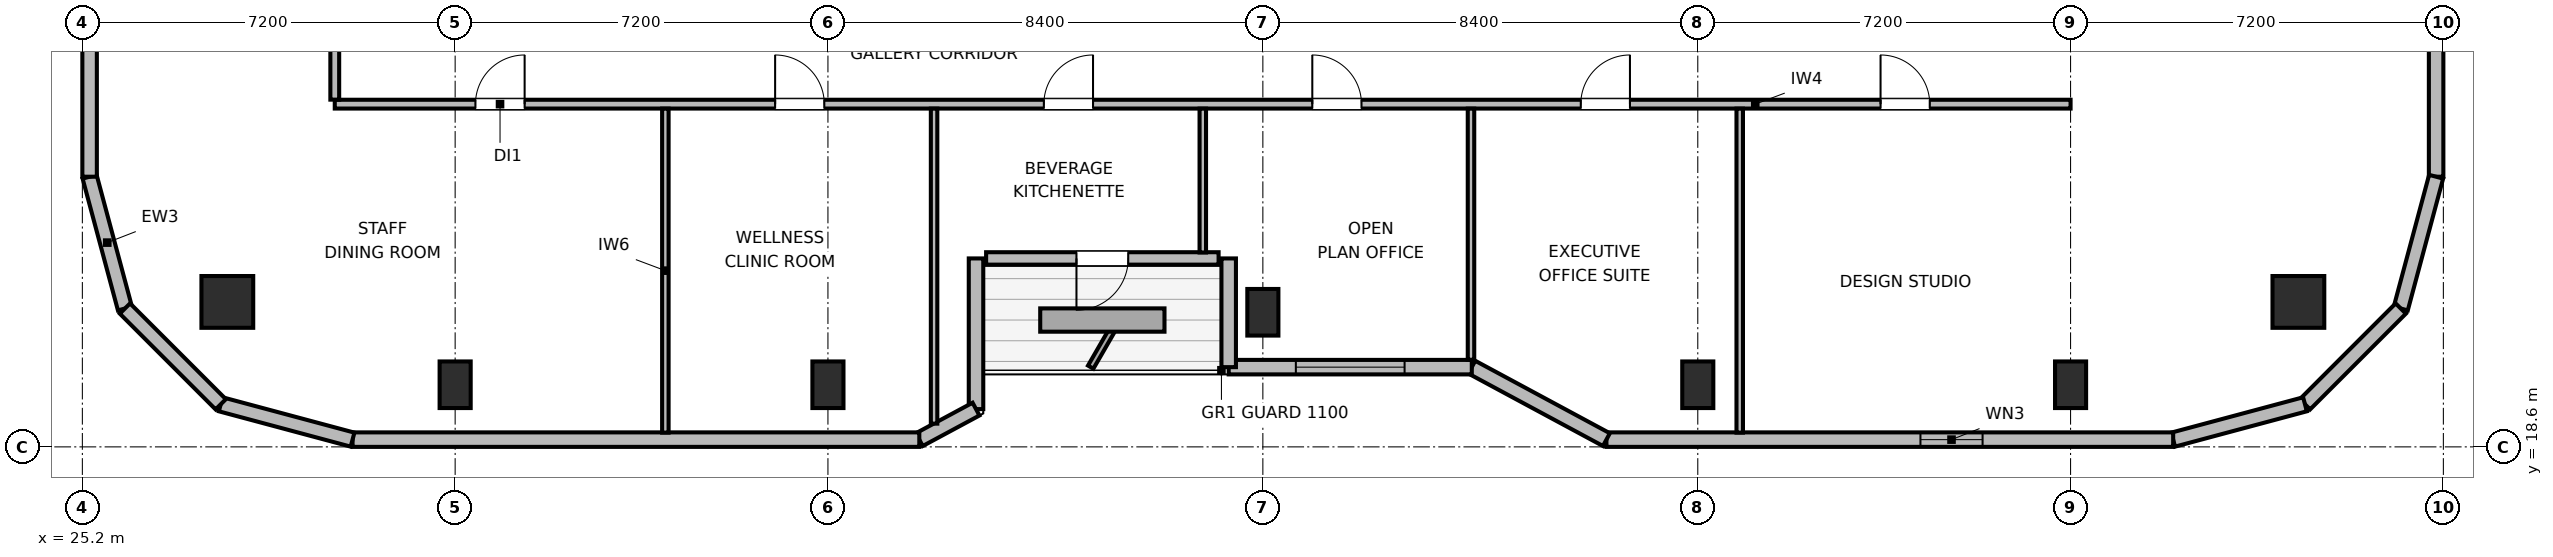
"""IFC4 building model, lengths in metres.
Left out: names, types, materials, properties, quantities, classifications, styles, units other than length and angle.
Written with IfcOpenShell. Run it as: python <this file> out.ifc"""

import sys

from ifc_helpers import new_model, si_unit, direction, frame, frame_2d, origin, origin_2d, place, context, subcontext, project, spatial, rectangle, circle, extrude, element, fill, save


model = new_model("IFC4")
c1 = context("Model", 3, precision=1e-05, world=origin(), true_north=direction((0.0, 1.0)))
c2 = subcontext(c1, "Body", "Model", "MODEL_VIEW")
j1 = project(units=[si_unit("LENGTHUNIT", "METRE"), si_unit("PLANEANGLEUNIT", "RADIAN")], contexts=[c1])
p1 = place(None, origin())
s1 = spatial("IfcSite", under=j1, at=p1, CompositionType="ELEMENT")
p2 = place(p1, origin())
s2 = spatial("IfcBuilding", under=s1, at=p2, CompositionType="ELEMENT")
p3 = place(p2, frame((0.0, 0.0, 247.2)))
s3 = spatial("IfcBuildingStorey", under=s2, at=p3, CompositionType="ELEMENT", Elevation=247.2)
for number, where, z_axis, x_axis in (
    (1, (28.0, 21.4, 0.0), (0.0, 0.0, 1.0), (1.0, 0.0, 0.0)),
    (2, (68.0, 21.4, 0.0), (0.0, 0.0, 1.0), (1.0, 0.0, 0.0)),
):
    element("IfcColumn", number, at=place(p3, frame(where, z_axis=z_axis, x_axis=x_axis)), inside=s3, PredefinedType="COLUMN", context=c2, shape_type="SweptSolid", body=[
        extrude(circle(Radius=0.5, at=origin_2d()), origin(), (0.0, 0.0, 1.0), 3.9),
    ])
for number, where, z_axis, x_axis in (
    (3, (32.4, 19.8, 0.0), (0.0, 0.0, 1.0), (1.0, 0.0, 0.0)),
    (4, (39.6, 19.8, 0.0), (0.0, 0.0, 1.0), (1.0, 0.0, 0.0)),
    (5, (48.0, 21.2, 0.0), (0.0, 0.0, 1.0), (1.0, 0.0, 0.0)),
    (6, (56.4, 19.8, 0.0), (0.0, 0.0, 1.0), (1.0, 0.0, 0.0)),
    (7, (63.6, 19.8, 0.0), (0.0, 0.0, 1.0), (1.0, 0.0, 0.0)),
):
    element("IfcColumn", number, at=place(p3, frame(where, z_axis=z_axis, x_axis=x_axis)), inside=s3, PredefinedType="COLUMN", context=c2, shape_type="SweptSolid", body=[
        extrude(rectangle(XDim=0.6, YDim=0.9, at=origin_2d()), origin(), (0.0, 0.0, 1.0), 3.9),
    ])
p4 = place(p3, frame((26.022, 21.272, 0.0), z_axis=(0.0, 0.0, 1.0), x_axis=(-0.2588904131, 0.965906700466, 0.0)))
e8 = element("IfcWall", 8, at=p4, inside=s3, PredefinedType="SOLIDWALL", context=c2, shape_type="SweptSolid", body=[
    extrude(rectangle(XDim=2.636, YDim=0.28, at=frame_2d((1.318, 0.0))), origin(), (0.0, 0.0, 1.0), 3.68),
])
p5 = place(p3, frame((25.34, 23.818, 0.0), z_axis=(0.0, 0.0, 1.0), x_axis=(0.0, 1.0, 0.0)))
e9 = element("IfcWall", 9, at=p5, inside=s3, PredefinedType="SOLIDWALL", context=c2, shape_type="SweptSolid", body=[
    extrude(rectangle(XDim=5.442, YDim=0.28, at=frame_2d((2.721, 0.0))), origin(), (0.0, 0.0, 1.0), 3.68),
])
p6 = place(p3, frame((70.66, 37.66, 0.0), z_axis=(0.0, 0.0, 1.0), x_axis=(0.0, -1.0, 0.0)))
e10 = element("IfcWall", 10, at=p6, inside=s3, PredefinedType="SOLIDWALL", context=c2, shape_type="SweptSolid", body=[
    extrude(rectangle(XDim=13.842, YDim=0.28, at=frame_2d((6.921, 0.0))), origin(), (0.0, 0.0, 1.0), 3.68),
])
p7 = place(p6, frame((5.871, 0.0, 0.85)))
e11 = element("IfcOpeningElement", 11, at=p7, cuts=e10, PredefinedType="OPENING", context=c2, shape_type="SweptSolid", body=[
    extrude(rectangle(XDim=2.1, YDim=1.05, at=frame_2d((1.05, 0.525))), frame((0.0, 0.15, 0.0), z_axis=(0.0, -1.0, 0.0), x_axis=(1.0, 0.0, 0.0)), (0.0, 0.0, 1.0), 0.3),
])
p8 = place(p3, frame((70.66, 23.818, 0.0), z_axis=(0.0, 0.0, 1.0), x_axis=(-0.2588904131, -0.965906700466, 0.0)))
e12 = element("IfcWall", 12, at=p8, inside=s3, PredefinedType="SOLIDWALL", context=c2, shape_type="SweptSolid", body=[
    extrude(rectangle(XDim=2.636, YDim=0.28, at=frame_2d((1.318, 0.0))), origin(), (0.0, 0.0, 1.0), 3.68),
])
p9 = place(p3, frame((69.978, 21.272, 0.0), z_axis=(0.0, 0.0, 1.0), x_axis=(-0.707153437963, -0.707060121331, 0.0)))
e13 = element("IfcWall", 13, at=p9, inside=s3, PredefinedType="SOLIDWALL", context=c2, shape_type="SweptSolid", body=[
    extrude(rectangle(XDim=2.616, YDim=0.28, at=frame_2d((1.308, 0.0))), origin(), (0.0, 0.0, 1.0), 3.68),
])
p10 = place(p3, frame((68.127, 19.423, 0.0), z_axis=(0.0, 0.0, 1.0), x_axis=(-0.965883534663, -0.258976828051, 0.0)))
e14 = element("IfcWall", 14, at=p10, inside=s3, PredefinedType="SOLIDWALL", context=c2, shape_type="SweptSolid", body=[
    extrude(rectangle(XDim=2.636, YDim=0.28, at=frame_2d((1.318, 0.0))), origin(), (0.0, 0.0, 1.0), 3.68),
])
p11 = place(p3, frame((65.582, 18.74, 0.0), z_axis=(0.0, 0.0, 1.0), x_axis=(-1.0, 0.0, 0.0)))
e15 = element("IfcWall", 15, at=p11, inside=s3, PredefinedType="SOLIDWALL", context=c2, shape_type="SweptSolid", body=[
    extrude(rectangle(XDim=10.946, YDim=0.28, at=frame_2d((5.473, 0.0))), origin(), (0.0, 0.0, 1.0), 3.68),
])
p12 = place(p11, frame((3.681, 0.0, 0.85)))
e16 = element("IfcOpeningElement", 16, at=p12, cuts=e15, PredefinedType="OPENING", context=c2, shape_type="SweptSolid", body=[
    extrude(rectangle(XDim=1.2, YDim=1.1, at=frame_2d((0.6, 0.55))), frame((0.0, 0.15, 0.0), z_axis=(0.0, -1.0, 0.0), x_axis=(1.0, 0.0, 0.0)), (0.0, 0.0, 1.0), 0.3),
])
p13 = place(p3, frame((54.635, 18.74, 0.0), z_axis=(0.0, 0.0, 1.0), x_axis=(-0.880473754814, 0.474094892488, 0.0)))
e17 = element("IfcWall", 17, at=p13, inside=s3, PredefinedType="SOLIDWALL", context=c2, shape_type="SweptSolid", body=[
    extrude(rectangle(XDim=2.953, YDim=0.28, at=frame_2d((1.477, 0.0))), origin(), (0.0, 0.0, 1.0), 2.265),
])
p14 = place(p3, frame((52.035, 20.14, 0.0), z_axis=(0.0, 0.0, 1.0), x_axis=(-1.0, 0.0, 0.0)))
e18 = element("IfcWall", 18, at=p14, inside=s3, PredefinedType="SOLIDWALL", context=c2, shape_type="SweptSolid", body=[
    extrude(rectangle(XDim=4.695, YDim=0.28, at=frame_2d((2.348, 0.0))), origin(), (0.0, 0.0, 1.0), 2.265),
])
p15 = place(p14, frame((1.298, 0.0, 0.85)))
e19 = element("IfcOpeningElement", 19, at=p15, cuts=e18, PredefinedType="OPENING", context=c2, shape_type="SweptSolid", body=[
    extrude(rectangle(XDim=2.1, YDim=1.05, at=frame_2d((1.05, 0.525))), frame((0.0, 0.15, 0.0), z_axis=(0.0, -1.0, 0.0), x_axis=(1.0, 0.0, 0.0)), (0.0, 0.0, 1.0), 0.3),
])
p16 = place(p3, frame((47.34, 20.14, 0.0), z_axis=(0.0, 0.0, 1.0), x_axis=(0.0, 1.0, 0.0)))
e20 = element("IfcWall", 20, at=p16, inside=s3, PredefinedType="SOLIDWALL", context=c2, shape_type="SweptSolid", body=[
    extrude(rectangle(XDim=2.1, YDim=0.28, at=frame_2d((1.05, 0.0))), origin(), (0.0, 0.0, 1.0), 2.265),
])
p17 = place(p3, frame((47.145, 22.24, 0.0), z_axis=(0.0, 0.0, 1.0), x_axis=(-1.0, 0.0, 0.0)))
e21 = element("IfcWall", 21, at=p17, inside=s3, PredefinedType="SOLIDWALL", context=c2, shape_type="SweptSolid", body=[
    extrude(rectangle(XDim=4.49, YDim=0.24, at=frame_2d((2.245, 0.0))), origin(), (0.0, 0.0, 1.0), 3.68),
])
p18 = place(p17, frame((1.745, 0.0, 0.0)))
e22 = element("IfcOpeningElement", 22, at=p18, cuts=e21, PredefinedType="OPENING", context=c2, shape_type="SweptSolid", body=[
    extrude(rectangle(XDim=1.0, YDim=2.02, at=frame_2d((0.5, 1.01))), frame((0.0, 0.13, 0.0), z_axis=(0.0, -1.0, 0.0), x_axis=(1.0, 0.0, 0.0)), (0.0, 0.0, 1.0), 0.26),
])
p19 = place(p3, frame((42.46, 22.24, 0.0), z_axis=(0.0, 0.0, 1.0), x_axis=(0.0, -1.0, 0.0)))
e23 = element("IfcWall", 23, at=p19, inside=s3, PredefinedType="SOLIDWALL", context=c2, shape_type="SweptSolid", body=[
    extrude(rectangle(XDim=2.91, YDim=0.28, at=frame_2d((1.455, 0.0))), origin(), (0.0, 0.0, 1.0), 2.265),
])
p20 = place(p3, frame((42.46, 19.33, 0.0), z_axis=(0.0, 0.0, 1.0), x_axis=(-0.880515214249, -0.474017887296, 0.0)))
e24 = element("IfcWall", 24, at=p20, inside=s3, PredefinedType="SOLIDWALL", context=c2, shape_type="SweptSolid", body=[
    extrude(rectangle(XDim=1.244, YDim=0.28, at=frame_2d((0.622, 0.0))), origin(), (0.0, 0.0, 1.0), 3.68),
])
p21 = place(p3, frame((41.365, 18.74, 0.0), z_axis=(0.0, 0.0, 1.0), x_axis=(-1.0, 0.0, 0.0)))
e25 = element("IfcWall", 25, at=p21, inside=s3, PredefinedType="SOLIDWALL", context=c2, shape_type="SweptSolid", body=[
    extrude(rectangle(XDim=10.946, YDim=0.28, at=frame_2d((5.473, 0.0))), origin(), (0.0, 0.0, 1.0), 3.68),
])
p22 = place(p3, frame((30.418, 18.74, 0.0), z_axis=(0.0, 0.0, 1.0), x_axis=(-0.965883534663, 0.258976828051, 0.0)))
e26 = element("IfcWall", 26, at=p22, inside=s3, PredefinedType="SOLIDWALL", context=c2, shape_type="SweptSolid", body=[
    extrude(rectangle(XDim=2.636, YDim=0.28, at=frame_2d((1.318, 0.0))), origin(), (0.0, 0.0, 1.0), 3.68),
])
p23 = place(p3, frame((27.873, 19.423, 0.0), z_axis=(0.0, 0.0, 1.0), x_axis=(-0.707153437963, 0.707060121331, 0.0)))
e27 = element("IfcWall", 27, at=p23, inside=s3, PredefinedType="SOLIDWALL", context=c2, shape_type="SweptSolid", body=[
    extrude(rectangle(XDim=2.616, YDim=0.28, at=frame_2d((1.308, 0.0))), origin(), (0.0, 0.0, 1.0), 3.68),
])
p24 = place(p3, frame((30.075, 25.22, 0.0), z_axis=(0.0, 0.0, 1.0), x_axis=(1.0, 0.0, 0.0)))
e28 = element("IfcWall", 28, at=p24, inside=s3, PredefinedType="PARTITIONING", context=c2, shape_type="SweptSolid", body=[
    extrude(rectangle(XDim=33.525, YDim=0.17, at=frame_2d((16.763, 0.0))), origin(), (0.0, 0.0, 1.0), 3.68),
])
p25 = place(p24, frame((2.717, 0.0, 0.0)))
e29 = element("IfcOpeningElement", 29, at=p25, cuts=e28, PredefinedType="OPENING", context=c2, shape_type="SweptSolid", body=[
    extrude(rectangle(XDim=0.95, YDim=2.04, at=frame_2d((0.475, 1.02))), frame((0.0, 0.095, 0.0), z_axis=(0.0, -1.0, 0.0), x_axis=(1.0, 0.0, 0.0)), (0.0, 0.0, 1.0), 0.19),
])
p26 = place(p24, frame((8.505, 0.0, 0.0)))
e30 = element("IfcOpeningElement", 30, at=p26, cuts=e28, PredefinedType="OPENING", context=c2, shape_type="SweptSolid", body=[
    extrude(rectangle(XDim=0.95, YDim=2.04, at=frame_2d((0.475, 1.02))), frame((0.0, 0.095, 0.0), z_axis=(0.0, -1.0, 0.0), x_axis=(1.0, 0.0, 0.0)), (0.0, 0.0, 1.0), 0.19),
])
p27 = place(p24, frame((13.695, 0.0, 0.0)))
e31 = element("IfcOpeningElement", 31, at=p27, cuts=e28, PredefinedType="OPENING", context=c2, shape_type="SweptSolid", body=[
    extrude(rectangle(XDim=0.95, YDim=2.04, at=frame_2d((0.475, 1.02))), frame((0.0, 0.095, 0.0), z_axis=(0.0, -1.0, 0.0), x_axis=(1.0, 0.0, 0.0)), (0.0, 0.0, 1.0), 0.19),
])
p28 = place(p24, frame((18.88, 0.0, 0.0)))
e32 = element("IfcOpeningElement", 32, at=p28, cuts=e28, PredefinedType="OPENING", context=c2, shape_type="SweptSolid", body=[
    extrude(rectangle(XDim=0.95, YDim=2.04, at=frame_2d((0.475, 1.02))), frame((0.0, 0.095, 0.0), z_axis=(0.0, -1.0, 0.0), x_axis=(1.0, 0.0, 0.0)), (0.0, 0.0, 1.0), 0.19),
])
p29 = place(p24, frame((24.065, 0.0, 0.0)))
e33 = element("IfcOpeningElement", 33, at=p29, cuts=e28, PredefinedType="OPENING", context=c2, shape_type="SweptSolid", body=[
    extrude(rectangle(XDim=0.95, YDim=2.04, at=frame_2d((0.475, 1.02))), frame((0.0, 0.095, 0.0), z_axis=(0.0, -1.0, 0.0), x_axis=(1.0, 0.0, 0.0)), (0.0, 0.0, 1.0), 0.19),
])
p30 = place(p24, frame((29.855, 0.0, 0.0)))
e34 = element("IfcOpeningElement", 34, at=p30, cuts=e28, PredefinedType="OPENING", context=c2, shape_type="SweptSolid", body=[
    extrude(rectangle(XDim=0.95, YDim=2.04, at=frame_2d((0.475, 1.02))), frame((0.0, 0.095, 0.0), z_axis=(0.0, -1.0, 0.0), x_axis=(1.0, 0.0, 0.0)), (0.0, 0.0, 1.0), 0.19),
])
p31 = place(p3, frame((30.075, 25.307, 0.0), z_axis=(0.0, 0.0, 1.0), x_axis=(0.0, 1.0, 0.0)))
e35 = element("IfcWall", 35, at=p31, inside=s3, PredefinedType="PARTITIONING", context=c2, shape_type="SweptSolid", body=[
    extrude(rectangle(XDim=21.386, YDim=0.17, at=frame_2d((10.693, 0.0))), origin(), (0.0, 0.0, 1.0), 3.68),
])
p32 = place(p31, frame((4.428, 0.0, 0.0)))
e36 = element("IfcOpeningElement", 36, at=p32, cuts=e35, PredefinedType="OPENING", context=c2, shape_type="SweptSolid", body=[
    extrude(rectangle(XDim=0.95, YDim=2.04, at=frame_2d((0.475, 1.02))), frame((0.0, 0.095, 0.0), z_axis=(0.0, -1.0, 0.0), x_axis=(1.0, 0.0, 0.0)), (0.0, 0.0, 1.0), 0.19),
])
p33 = place(p31, frame((15.208, 0.0, 0.0)))
e37 = element("IfcOpeningElement", 37, at=p33, cuts=e35, PredefinedType="OPENING", context=c2, shape_type="SweptSolid", body=[
    extrude(rectangle(XDim=0.95, YDim=2.04, at=frame_2d((0.475, 1.02))), frame((0.0, 0.095, 0.0), z_axis=(0.0, -1.0, 0.0), x_axis=(1.0, 0.0, 0.0)), (0.0, 0.0, 1.0), 0.19),
])
p34 = place(p3, frame((36.46, 18.875, 0.0), z_axis=(0.0, 0.0, 1.0), x_axis=(0.0, 1.0, 0.0)))
e38 = element("IfcWall", 38, at=p34, inside=s3, PredefinedType="PARTITIONING", context=c2, shape_type="SweptSolid", body=[
    extrude(rectangle(XDim=6.258, YDim=0.125, at=frame_2d((3.129, 0.0))), origin(), (0.0, 0.0, 1.0), 3.68),
])
p35 = place(p3, frame((41.65, 19.049, 0.0), z_axis=(0.0, 0.0, 1.0), x_axis=(0.0, 1.0, 0.0)))
e39 = element("IfcWall", 39, at=p35, inside=s3, PredefinedType="PARTITIONING", context=c2, shape_type="SweptSolid", body=[
    extrude(rectangle(XDim=6.084, YDim=0.125, at=frame_2d((3.042, 0.0))), origin(), (0.0, 0.0, 1.0), 3.043),
])
p36 = place(p3, frame((46.84, 22.355, 0.0), z_axis=(0.0, 0.0, 1.0), x_axis=(0.0, 1.0, 0.0)))
e40 = element("IfcWall", 40, at=p36, inside=s3, PredefinedType="PARTITIONING", context=c2, shape_type="SweptSolid", body=[
    extrude(rectangle(XDim=2.778, YDim=0.125, at=frame_2d((1.389, 0.0))), origin(), (0.0, 0.0, 1.0), 3.68),
])
p37 = place(p3, frame((52.02, 20.283, 0.0), z_axis=(0.0, 0.0, 1.0), x_axis=(0.0, 1.0, 0.0)))
e41 = element("IfcWall", 41, at=p37, inside=s3, PredefinedType="PARTITIONING", context=c2, shape_type="SweptSolid", body=[
    extrude(rectangle(XDim=4.85, YDim=0.125, at=frame_2d((2.425, 0.0))), origin(), (0.0, 0.0, 1.0), 3.68),
])
p38 = place(p3, frame((57.21, 18.875, 0.0), z_axis=(0.0, 0.0, 1.0), x_axis=(0.0, 1.0, 0.0)))
e42 = element("IfcWall", 42, at=p38, inside=s3, PredefinedType="PARTITIONING", context=c2, shape_type="SweptSolid", body=[
    extrude(rectangle(XDim=6.258, YDim=0.125, at=frame_2d((3.129, 0.0))), origin(), (0.0, 0.0, 1.0), 3.68),
])
p39 = place(p12, origin())
e43 = element("IfcWindow", 43, at=p39, inside=s3, PartitioningType="SINGLE_PANEL", PredefinedType="WINDOW", context=c2, shape_type="SweptSolid", body=[
    extrude(rectangle(XDim=1.2, YDim=1.1, at=frame_2d((0.6, 0.55))), frame((0.0, 0.03, 0.0), z_axis=(0.0, -1.0, 0.0), x_axis=(1.0, 0.0, 0.0)), (0.0, 0.0, 1.0), 0.06),
])
fill(e16, e43)
p40 = place(p15, origin())
e44 = element("IfcWindow", 44, at=p40, inside=s3, PartitioningType="SINGLE_PANEL", PredefinedType="WINDOW", context=c2, shape_type="SweptSolid", body=[
    extrude(rectangle(XDim=2.1, YDim=1.05, at=frame_2d((1.05, 0.525))), frame((0.0, 0.03, 0.0), z_axis=(0.0, -1.0, 0.0), x_axis=(1.0, 0.0, 0.0)), (0.0, 0.0, 1.0), 0.06),
])
fill(e19, e44)
p41 = place(p18, origin())
e45 = element("IfcDoor", 45, at=p41, inside=s3, OperationType="SINGLE_SWING_RIGHT", PredefinedType="DOOR", context=c2, shape_type="SweptSolid", body=[
    extrude(rectangle(XDim=1.0, YDim=2.02, at=frame_2d((0.5, 1.01))), frame((0.0, 0.025, 0.0), z_axis=(0.0, -1.0, 0.0), x_axis=(1.0, 0.0, 0.0)), (0.0, 0.0, 1.0), 0.05),
])
fill(e22, e45)
p42 = place(p25, origin())
e46 = element("IfcDoor", 46, at=p42, inside=s3, OperationType="SINGLE_SWING_RIGHT", PredefinedType="DOOR", context=c2, shape_type="SweptSolid", body=[
    extrude(rectangle(XDim=0.95, YDim=2.04, at=frame_2d((0.475, 1.02))), frame((0.0, 0.025, 0.0), z_axis=(0.0, -1.0, 0.0), x_axis=(1.0, 0.0, 0.0)), (0.0, 0.0, 1.0), 0.05),
])
fill(e29, e46)
p43 = place(p26, origin())
e47 = element("IfcDoor", 47, at=p43, inside=s3, OperationType="SINGLE_SWING_LEFT", PredefinedType="DOOR", context=c2, shape_type="SweptSolid", body=[
    extrude(rectangle(XDim=0.95, YDim=2.04, at=frame_2d((0.475, 1.02))), frame((0.0, 0.025, 0.0), z_axis=(0.0, -1.0, 0.0), x_axis=(1.0, 0.0, 0.0)), (0.0, 0.0, 1.0), 0.05),
])
fill(e30, e47)
p44 = place(p27, origin())
e48 = element("IfcDoor", 48, at=p44, inside=s3, OperationType="SINGLE_SWING_RIGHT", PredefinedType="DOOR", context=c2, shape_type="SweptSolid", body=[
    extrude(rectangle(XDim=0.95, YDim=2.04, at=frame_2d((0.475, 1.02))), frame((0.0, 0.025, 0.0), z_axis=(0.0, -1.0, 0.0), x_axis=(1.0, 0.0, 0.0)), (0.0, 0.0, 1.0), 0.05),
])
fill(e31, e48)
p45 = place(p28, origin())
e49 = element("IfcDoor", 49, at=p45, inside=s3, OperationType="SINGLE_SWING_LEFT", PredefinedType="DOOR", context=c2, shape_type="SweptSolid", body=[
    extrude(rectangle(XDim=0.95, YDim=2.04, at=frame_2d((0.475, 1.02))), frame((0.0, 0.025, 0.0), z_axis=(0.0, -1.0, 0.0), x_axis=(1.0, 0.0, 0.0)), (0.0, 0.0, 1.0), 0.05),
])
fill(e32, e49)
p46 = place(p29, origin())
e50 = element("IfcDoor", 50, at=p46, inside=s3, OperationType="SINGLE_SWING_RIGHT", PredefinedType="DOOR", context=c2, shape_type="SweptSolid", body=[
    extrude(rectangle(XDim=0.95, YDim=2.04, at=frame_2d((0.475, 1.02))), frame((0.0, 0.025, 0.0), z_axis=(0.0, -1.0, 0.0), x_axis=(1.0, 0.0, 0.0)), (0.0, 0.0, 1.0), 0.05),
])
fill(e33, e50)
p47 = place(p30, origin())
e51 = element("IfcDoor", 51, at=p47, inside=s3, OperationType="SINGLE_SWING_LEFT", PredefinedType="DOOR", context=c2, shape_type="SweptSolid", body=[
    extrude(rectangle(XDim=0.95, YDim=2.04, at=frame_2d((0.475, 1.02))), frame((0.0, 0.025, 0.0), z_axis=(0.0, -1.0, 0.0), x_axis=(1.0, 0.0, 0.0)), (0.0, 0.0, 1.0), 0.05),
])
fill(e34, e51)
save(model, sys.argv[1])
